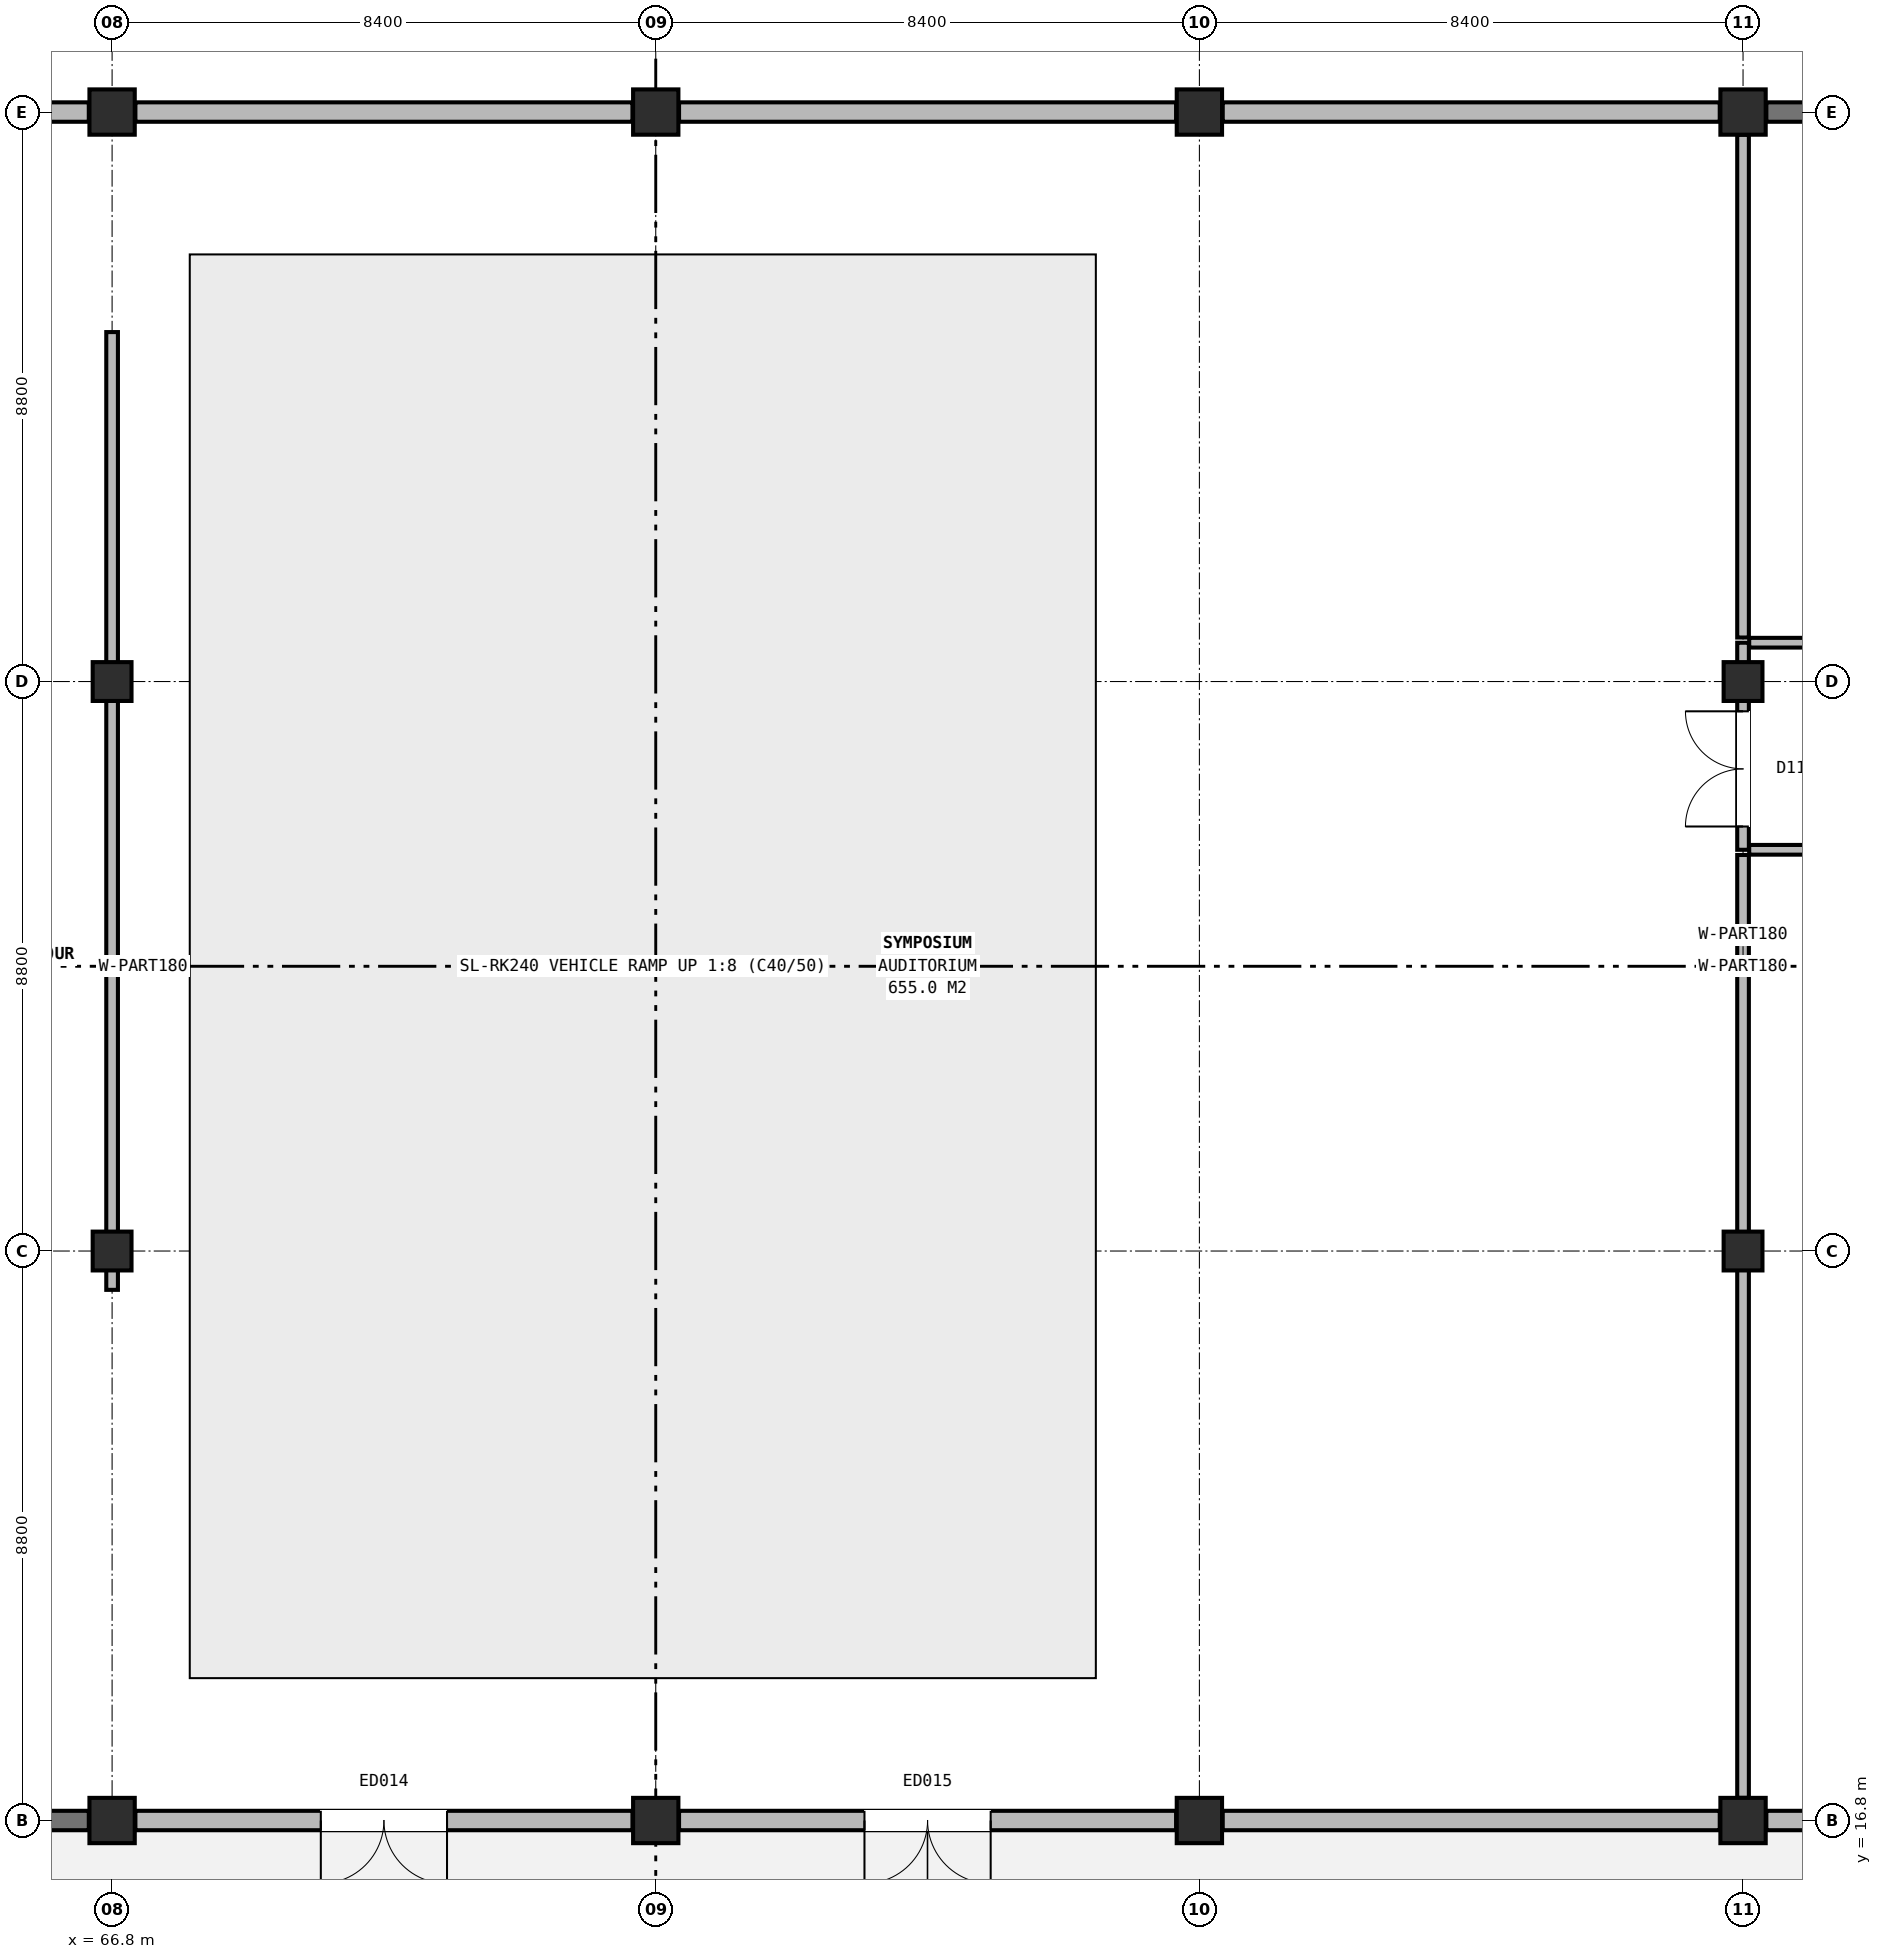
"""IFC4 building model, lengths in metres.
Left out: names, types, materials, properties, quantities, classifications, styles, units other than length and angle.
Written with IfcOpenShell. Run it as: python <this file> out.ifc"""

import sys

from ifc_helpers import new_model, si_unit, direction, frame, frame_2d, origin, origin_2d, place, context, subcontext, project, spatial, rectangle, extrude, element, fill, save


model = new_model("IFC4")
c1 = context("Model", 3, precision=1e-05, world=origin(), true_north=direction((0.0, 1.0)))
c2 = subcontext(c1, "Body", "Model", "MODEL_VIEW")
j1 = project(units=[si_unit("LENGTHUNIT", "METRE"), si_unit("PLANEANGLEUNIT", "RADIAN")], contexts=[c1])
p1 = place(None, origin())
s1 = spatial("IfcSite", under=j1, at=p1, CompositionType="ELEMENT")
p2 = place(p1, origin())
s2 = spatial("IfcBuilding", under=s1, at=p2, CompositionType="ELEMENT")
p3 = place(p2, origin())
s3 = spatial("IfcBuildingStorey", under=s2, at=p3, CompositionType="ELEMENT", Elevation=0.0)
p4 = place(p3, frame((66.8, 16.8, 0.0), z_axis=(0.0, 0.0, 1.0), x_axis=(1.0, 0.0, 0.0)))
e1 = element("IfcColumn", 1, at=p4, inside=s3, PredefinedType="COLUMN", context=c2, shape_type="SweptSolid", body=[
    extrude(rectangle(XDim=0.7, YDim=0.7, at=origin_2d()), origin(), (0.0, 0.0, 1.0), 4.8),
])
for number, where, z_axis, x_axis in (
    (2, (66.8, 25.6, 0.0), (0.0, 0.0, 1.0), (1.0, 0.0, 0.0)),
    (3, (66.8, 34.4, 0.0), (0.0, 0.0, 1.0), (1.0, 0.0, 0.0)),
):
    element("IfcColumn", number, at=place(p3, frame(where, z_axis=z_axis, x_axis=x_axis)), inside=s3, PredefinedType="COLUMN", context=c2, shape_type="SweptSolid", body=[
        extrude(rectangle(XDim=0.6, YDim=0.6, at=origin_2d()), origin(), (0.0, 0.0, 1.0), 4.8),
    ])
for number, where, z_axis, x_axis in (
    (4, (66.8, 43.2, 0.0), (0.0, 0.0, 1.0), (1.0, 0.0, 0.0)),
    (5, (75.2, 16.8, 0.0), (0.0, 0.0, 1.0), (1.0, 0.0, 0.0)),
    (6, (75.2, 43.2, 0.0), (0.0, 0.0, 1.0), (1.0, 0.0, 0.0)),
    (7, (83.6, 16.8, 0.0), (0.0, 0.0, 1.0), (1.0, 0.0, 0.0)),
    (8, (83.6, 43.2, 0.0), (0.0, 0.0, 1.0), (1.0, 0.0, 0.0)),
    (9, (92.0, 16.8, 0.0), (0.0, 0.0, 1.0), (1.0, 0.0, 0.0)),
):
    element("IfcColumn", number, at=place(p3, frame(where, z_axis=z_axis, x_axis=x_axis)), inside=s3, PredefinedType="COLUMN", context=c2, shape_type="SweptSolid", body=[
        extrude(rectangle(XDim=0.7, YDim=0.7, at=origin_2d()), origin(), (0.0, 0.0, 1.0), 4.8),
    ])
for number, where, z_axis, x_axis in (
    (10, (92.0, 25.6, 0.0), (0.0, 0.0, 1.0), (1.0, 0.0, 0.0)),
    (11, (92.0, 34.4, 0.0), (0.0, 0.0, 1.0), (1.0, 0.0, 0.0)),
):
    element("IfcColumn", number, at=place(p3, frame(where, z_axis=z_axis, x_axis=x_axis)), inside=s3, PredefinedType="COLUMN", context=c2, shape_type="SweptSolid", body=[
        extrude(rectangle(XDim=0.6, YDim=0.6, at=origin_2d()), origin(), (0.0, 0.0, 1.0), 4.8),
    ])
p5 = place(p3, frame((92.0, 43.2, 0.0), z_axis=(0.0, 0.0, 1.0), x_axis=(1.0, 0.0, 0.0)))
e12 = element("IfcColumn", 12, at=p5, inside=s3, PredefinedType="COLUMN", context=c2, shape_type="SweptSolid", body=[
    extrude(rectangle(XDim=0.7, YDim=0.7, at=origin_2d()), origin(), (0.0, 0.0, 1.0), 4.8),
])
p6 = place(p3, frame((58.71, 16.8, 0.0), z_axis=(0.0, 0.0, 1.0), x_axis=(1.0, 0.0, 0.0)))
e13 = element("IfcWall", 13, at=p6, inside=s3, PredefinedType="SHEAR", context=c2, shape_type="SweptSolid", body=[
    extrude(rectangle(XDim=7.73, YDim=0.3, at=frame_2d((3.865, 0.0))), origin(), (0.0, 0.0, 1.0), 4.05),
])
p7 = place(p6, frame((0.55, 0.0, 0.0)))
e14 = element("IfcOpeningElement", 14, at=p7, cuts=e13, PredefinedType="OPENING", context=c2, shape_type="SweptSolid", body=[
    extrude(rectangle(XDim=1.1, YDim=2.2, at=frame_2d((0.55, 1.1))), frame((0.0, 0.16, 0.0), z_axis=(0.0, -1.0, 0.0), x_axis=(1.0, 0.0, 0.0)), (0.0, 0.0, 1.0), 0.32),
])
p8 = place(p3, frame((67.16, 16.8, 0.0), z_axis=(0.0, 0.0, 1.0), x_axis=(1.0, 0.0, 0.0)))
e15 = element("IfcWall", 15, at=p8, inside=s3, PredefinedType="SOLIDWALL", context=c2, shape_type="SweptSolid", body=[
    extrude(rectangle(XDim=7.68, YDim=0.3, at=frame_2d((3.84, 0.0))), origin(), (0.0, 0.0, 1.0), 4.05),
])
p9 = place(p8, frame((2.865, 0.0, 0.0)))
e16 = element("IfcOpeningElement", 16, at=p9, cuts=e15, PredefinedType="OPENING", context=c2, shape_type="SweptSolid", body=[
    extrude(rectangle(XDim=1.95, YDim=2.45, at=frame_2d((0.975, 1.225))), frame((0.0, 0.16, 0.0), z_axis=(0.0, -1.0, 0.0), x_axis=(1.0, 0.0, 0.0)), (0.0, 0.0, 1.0), 0.32),
])
p10 = place(p3, frame((75.56, 16.8, 0.0), z_axis=(0.0, 0.0, 1.0), x_axis=(1.0, 0.0, 0.0)))
e17 = element("IfcWall", 17, at=p10, inside=s3, PredefinedType="SOLIDWALL", context=c2, shape_type="SweptSolid", body=[
    extrude(rectangle(XDim=7.68, YDim=0.3, at=frame_2d((3.84, 0.0))), origin(), (0.0, 0.0, 1.0), 4.05),
])
p11 = place(p10, frame((2.865, 0.0, 0.0)))
e18 = element("IfcOpeningElement", 18, at=p11, cuts=e17, PredefinedType="OPENING", context=c2, shape_type="SweptSolid", body=[
    extrude(rectangle(XDim=1.95, YDim=2.45, at=frame_2d((0.975, 1.225))), frame((0.0, 0.16, 0.0), z_axis=(0.0, -1.0, 0.0), x_axis=(1.0, 0.0, 0.0)), (0.0, 0.0, 1.0), 0.32),
])
p12 = place(p3, frame((83.96, 16.8, 0.0), z_axis=(0.0, 0.0, 1.0), x_axis=(1.0, 0.0, 0.0)))
e19 = element("IfcWall", 19, at=p12, inside=s3, PredefinedType="SOLIDWALL", context=c2, shape_type="SweptSolid", body=[
    extrude(rectangle(XDim=7.68, YDim=0.3, at=frame_2d((3.84, 0.0))), origin(), (0.0, 0.0, 1.0), 4.05),
])
p13 = place(p3, frame((92.36, 16.8, 0.0), z_axis=(0.0, 0.0, 1.0), x_axis=(1.0, 0.0, 0.0)))
e20 = element("IfcWall", 20, at=p13, inside=s3, PredefinedType="SOLIDWALL", context=c2, shape_type="SweptSolid", body=[
    extrude(rectangle(XDim=7.73, YDim=0.3, at=frame_2d((3.865, 0.0))), origin(), (0.0, 0.0, 1.0), 4.05),
])
p14 = place(p13, frame((2.89, 0.0, 0.0)))
e21 = element("IfcOpeningElement", 21, at=p14, cuts=e20, PredefinedType="OPENING", context=c2, shape_type="SweptSolid", body=[
    extrude(rectangle(XDim=1.95, YDim=2.45, at=frame_2d((0.975, 1.225))), frame((0.0, 0.16, 0.0), z_axis=(0.0, -1.0, 0.0), x_axis=(1.0, 0.0, 0.0)), (0.0, 0.0, 1.0), 0.32),
])
p15 = place(p3, frame((100.09, 43.2, 0.0), z_axis=(0.0, 0.0, 1.0), x_axis=(-1.0, 0.0, 0.0)))
e22 = element("IfcWall", 22, at=p15, inside=s3, PredefinedType="SHEAR", context=c2, shape_type="SweptSolid", body=[
    extrude(rectangle(XDim=7.73, YDim=0.3, at=frame_2d((3.865, 0.0))), origin(), (0.0, 0.0, 1.0), 4.05),
])
p16 = place(p15, frame((0.55, 0.0, 0.0)))
e23 = element("IfcOpeningElement", 23, at=p16, cuts=e22, PredefinedType="OPENING", context=c2, shape_type="SweptSolid", body=[
    extrude(rectangle(XDim=1.1, YDim=2.2, at=frame_2d((0.55, 1.1))), frame((0.0, 0.16, 0.0), z_axis=(0.0, -1.0, 0.0), x_axis=(1.0, 0.0, 0.0)), (0.0, 0.0, 1.0), 0.32),
])
for number, where, z_axis, x_axis in (
    (24, (91.64, 43.2, 0.0), (0.0, 0.0, 1.0), (-1.0, 0.0, 0.0)),
    (25, (83.24, 43.2, 0.0), (0.0, 0.0, 1.0), (-1.0, 0.0, 0.0)),
):
    element("IfcWall", number, at=place(p3, frame(where, z_axis=z_axis, x_axis=x_axis)), inside=s3, PredefinedType="SOLIDWALL", context=c2, shape_type="SweptSolid", body=[
        extrude(rectangle(XDim=7.68, YDim=0.3, at=frame_2d((3.84, 0.0))), origin(), (0.0, 0.0, 1.0), 4.05),
    ])
p17 = place(p3, frame((74.84, 43.2, 0.0), z_axis=(0.0, 0.0, 1.0), x_axis=(-1.0, 0.0, 0.0)))
e26 = element("IfcWall", 26, at=p17, inside=s3, PredefinedType="SOLIDWALL", context=c2, shape_type="SweptSolid", body=[
    extrude(rectangle(XDim=7.68, YDim=0.3, at=frame_2d((3.84, 0.0))), origin(), (0.0, 0.0, 1.0), 4.05),
])
p18 = place(p3, frame((66.44, 43.2, 0.0), z_axis=(0.0, 0.0, 1.0), x_axis=(-1.0, 0.0, 0.0)))
e27 = element("IfcWall", 27, at=p18, inside=s3, PredefinedType="SOLIDWALL", context=c2, shape_type="SweptSolid", body=[
    extrude(rectangle(XDim=7.73, YDim=0.3, at=frame_2d((3.865, 0.0))), origin(), (0.0, 0.0, 1.0), 4.05),
])
p19 = place(p18, frame((4.615, 0.0, 0.9)))
e28 = element("IfcOpeningElement", 28, at=p19, cuts=e27, PredefinedType="OPENING", context=c2, shape_type="SweptSolid", body=[
    extrude(rectangle(XDim=2.74, YDim=2.2, at=frame_2d((1.37, 1.1))), frame((0.0, 0.16, 0.0), z_axis=(0.0, -1.0, 0.0), x_axis=(1.0, 0.0, 0.0)), (0.0, 0.0, 1.0), 0.32),
])
p20 = place(p3, frame((92.0, 31.8, 0.0), z_axis=(0.0, 0.0, 1.0), x_axis=(0.0, 1.0, 0.0)))
e29 = element("IfcWall", 29, at=p20, inside=s3, PredefinedType="PARTITIONING", context=c2, shape_type="SweptSolid", body=[
    extrude(rectangle(XDim=3.2, YDim=0.18, at=frame_2d((1.6, 0.0))), origin(), (0.0, 0.0, 1.0), 4.045),
])
p21 = place(p20, frame((0.36, 0.0, 0.0)))
e30 = element("IfcOpeningElement", 30, at=p21, cuts=e29, PredefinedType="OPENING", context=c2, shape_type="SweptSolid", body=[
    extrude(rectangle(XDim=1.78, YDim=2.3, at=frame_2d((0.89, 1.15))), frame((0.0, 0.1, 0.0), z_axis=(0.0, -1.0, 0.0), x_axis=(1.0, 0.0, 0.0)), (0.0, 0.0, 1.0), 0.2),
])
p22 = place(p3, frame((92.095, 31.8, 0.0), z_axis=(0.0, 0.0, 1.0), x_axis=(1.0, 0.0, 0.0)))
e31 = element("IfcWall", 31, at=p22, inside=s3, PredefinedType="PARTITIONING", context=c2, shape_type="SweptSolid", body=[
    extrude(rectangle(XDim=8.15, YDim=0.15, at=frame_2d((4.075, 0.0))), origin(), (0.0, 0.0, 1.0), 4.465),
])
p23 = place(p22, frame((3.605, 0.0, 0.0)))
e32 = element("IfcOpeningElement", 32, at=p23, cuts=e31, PredefinedType="OPENING", context=c2, shape_type="SweptSolid", body=[
    extrude(rectangle(XDim=0.94, YDim=2.12, at=frame_2d((0.47, 1.06))), frame((0.0, 0.085, 0.0), z_axis=(0.0, -1.0, 0.0), x_axis=(1.0, 0.0, 0.0)), (0.0, 0.0, 1.0), 0.17),
])
p24 = place(p3, frame((92.095, 35.0, 0.0), z_axis=(0.0, 0.0, 1.0), x_axis=(1.0, 0.0, 0.0)))
e33 = element("IfcWall", 33, at=p24, inside=s3, PredefinedType="PARTITIONING", context=c2, shape_type="SweptSolid", body=[
    extrude(rectangle(XDim=4.75, YDim=0.15, at=frame_2d((2.375, 0.0))), origin(), (0.0, 0.0, 1.0), 4.465),
])
p25 = place(p24, frame((1.875, 0.0, 0.0)))
e34 = element("IfcOpeningElement", 34, at=p25, cuts=e33, PredefinedType="OPENING", context=c2, shape_type="SweptSolid", body=[
    extrude(rectangle(XDim=1.0, YDim=2.16, at=frame_2d((0.5, 1.08))), frame((0.0, 0.085, 0.0), z_axis=(0.0, -1.0, 0.0), x_axis=(1.0, 0.0, 0.0)), (0.0, 0.0, 1.0), 0.17),
])
p26 = place(p3, frame((66.8, 25.0, 0.0), z_axis=(0.0, 0.0, 1.0), x_axis=(0.0, 1.0, 0.0)))
e35 = element("IfcWall", 35, at=p26, inside=s3, PredefinedType="PARTITIONING", context=c2, shape_type="SweptSolid", body=[
    extrude(rectangle(XDim=14.8, YDim=0.18, at=frame_2d((7.4, 0.0))), origin(), (0.0, 0.0, 1.0), 4.045),
])
p27 = place(p3, frame((92.0, 17.15, 0.0), z_axis=(0.0, 0.0, 1.0), x_axis=(0.0, 1.0, 0.0)))
e36 = element("IfcWall", 36, at=p27, inside=s3, PredefinedType="PARTITIONING", context=c2, shape_type="SweptSolid", body=[
    extrude(rectangle(XDim=14.57, YDim=0.18, at=frame_2d((7.285, 0.0))), origin(), (0.0, 0.0, 1.0), 4.045),
])
p28 = place(p3, frame((92.0, 35.08, 0.0), z_axis=(0.0, 0.0, 1.0), x_axis=(0.0, 1.0, 0.0)))
e37 = element("IfcWall", 37, at=p28, inside=s3, PredefinedType="PARTITIONING", context=c2, shape_type="SweptSolid", body=[
    extrude(rectangle(XDim=7.77, YDim=0.18, at=frame_2d((3.885, 0.0))), origin(), (0.0, 0.0, 1.0), 4.045),
])
p29 = place(p9, frame((1.95, 0.0, 0.0), z_axis=(0.0, 0.0, 1.0), x_axis=(-1.0, 0.0, 0.0)))
e38 = element("IfcDoor", 38, at=p29, inside=s3, OperationType="DOUBLE_DOOR_SINGLE_SWING", PredefinedType="DOOR", context=c2, shape_type="SweptSolid", body=[
    extrude(rectangle(XDim=1.95, YDim=2.45, at=frame_2d((0.975, 1.225))), frame((0.0, 0.025, 0.0), z_axis=(0.0, -1.0, 0.0), x_axis=(1.0, 0.0, 0.0)), (0.0, 0.0, 1.0), 0.05),
])
fill(e16, e38)
p30 = place(p11, frame((1.95, 0.0, 0.0), z_axis=(0.0, 0.0, 1.0), x_axis=(-1.0, 0.0, 0.0)))
e39 = element("IfcDoor", 39, at=p30, inside=s3, OperationType="DOUBLE_DOOR_SINGLE_SWING", PredefinedType="DOOR", context=c2, shape_type="SweptSolid", body=[
    extrude(rectangle(XDim=1.95, YDim=2.45, at=frame_2d((0.975, 1.225))), frame((0.0, 0.025, 0.0), z_axis=(0.0, -1.0, 0.0), x_axis=(1.0, 0.0, 0.0)), (0.0, 0.0, 1.0), 0.05),
])
fill(e18, e39)
p31 = place(p21, origin())
e40 = element("IfcDoor", 40, at=p31, inside=s3, OperationType="DOUBLE_DOOR_SINGLE_SWING", PredefinedType="DOOR", context=c2, shape_type="SweptSolid", body=[
    extrude(rectangle(XDim=1.78, YDim=2.3, at=frame_2d((0.89, 1.15))), frame((0.0, 0.025, 0.0), z_axis=(0.0, -1.0, 0.0), x_axis=(1.0, 0.0, 0.0)), (0.0, 0.0, 1.0), 0.05),
])
fill(e30, e40)
save(model, sys.argv[1])
